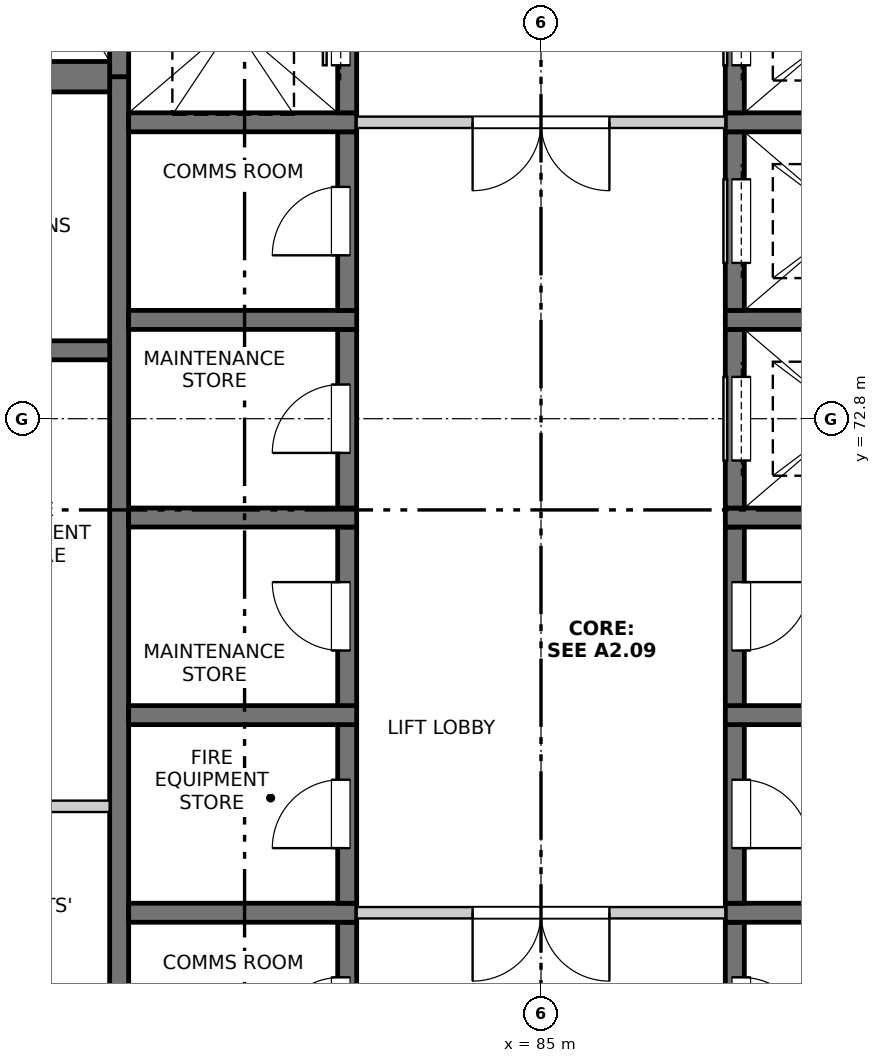
"""IFC4 building model, lengths in metres.
Left out: names, types, materials, properties, quantities, classifications, styles, units other than length and angle.
Written with IfcOpenShell. Run it as: python <this file> out.ifc"""

import sys

from ifc_helpers import new_model, si_unit, direction, frame, frame_2d, origin, place, context, subcontext, project, spatial, rectangle, extrude, element, fill, save


model = new_model("IFC4")
c1 = context("Model", 3, precision=1e-05, world=origin(), true_north=direction((0.0, 1.0)))
c2 = subcontext(c1, "Body", "Model", "MODEL_VIEW")
j1 = project(units=[si_unit("LENGTHUNIT", "METRE"), si_unit("PLANEANGLEUNIT", "RADIAN")], contexts=[c1])
p1 = place(None, origin())
s1 = spatial("IfcSite", under=j1, at=p1, CompositionType="ELEMENT")
p2 = place(p1, origin())
s2 = spatial("IfcBuilding", under=s1, at=p2, CompositionType="ELEMENT")
p3 = place(p2, frame((0.0, 0.0, 252.8)))
s3 = spatial("IfcBuildingStorey", under=s2, at=p3, CompositionType="ELEMENT", Elevation=252.8)
p4 = place(p3, frame((79.45, 60.975, -0.25), z_axis=(0.0, 0.0, 1.0), x_axis=(0.0, 1.0, 0.0)))
e1 = element("IfcWall", 1, at=p4, inside=s3, PredefinedType="SOLIDWALL", context=c2, shape_type="SweptSolid", body=[
    extrude(rectangle(XDim=16.325, YDim=0.25, at=frame_2d((8.163, 0.0))), origin(), (0.0, 0.0, 1.0), 3.4),
])
p5 = place(p3, frame((79.45, 77.3, -0.25), z_axis=(0.0, 0.0, 1.0), x_axis=(0.0, 1.0, 0.0)))
e2 = element("IfcWall", 2, at=p5, inside=s3, PredefinedType="SOLIDWALL", context=c2, shape_type="SweptSolid", body=[
    extrude(rectangle(XDim=7.0, YDim=0.25, at=frame_2d((3.5, 0.0))), origin(), (0.0, 0.0, 1.0), 3.4),
])
p6 = place(p3, frame((82.45, 63.825, -0.25), z_axis=(0.0, 0.0, 1.0), x_axis=(0.0, 1.0, 0.0)))
e3 = element("IfcWall", 3, at=p6, inside=s3, PredefinedType="SOLIDWALL", context=c2, shape_type="SweptSolid", body=[
    extrude(rectangle(XDim=2.35, YDim=0.25, at=frame_2d((1.175, 0.0))), origin(), (0.0, 0.0, 1.0), 3.4),
])
p7 = place(p6, frame((0.725, 0.0, 0.25)))
e4 = element("IfcOpeningElement", 4, at=p7, cuts=e3, PredefinedType="OPENING", context=c2, shape_type="SweptSolid", body=[
    extrude(rectangle(XDim=0.9, YDim=2.1, at=frame_2d((0.45, 1.05))), frame((0.0, 0.135, 0.0), z_axis=(0.0, -1.0, 0.0), x_axis=(1.0, 0.0, 0.0)), (0.0, 0.0, 1.0), 0.27),
])
p8 = place(p3, frame((79.575, 66.3, -0.25), z_axis=(0.0, 0.0, 1.0), x_axis=(1.0, 0.0, 0.0)))
e5 = element("IfcWall", 5, at=p8, inside=s3, PredefinedType="SOLIDWALL", context=c2, shape_type="SweptSolid", body=[
    extrude(rectangle(XDim=3.0, YDim=0.25, at=frame_2d((1.5, 0.0))), origin(), (0.0, 0.0, 1.0), 3.4),
])
p9 = place(p3, frame((82.45, 66.425, -0.25), z_axis=(0.0, 0.0, 1.0), x_axis=(0.0, 1.0, 0.0)))
e6 = element("IfcWall", 6, at=p9, inside=s3, PredefinedType="SOLIDWALL", context=c2, shape_type="SweptSolid", body=[
    extrude(rectangle(XDim=2.35, YDim=0.25, at=frame_2d((1.175, 0.0))), origin(), (0.0, 0.0, 1.0), 3.4),
])
p10 = place(p9, frame((0.725, 0.0, 0.25)))
e7 = element("IfcOpeningElement", 7, at=p10, cuts=e6, PredefinedType="OPENING", context=c2, shape_type="SweptSolid", body=[
    extrude(rectangle(XDim=0.9, YDim=2.1, at=frame_2d((0.45, 1.05))), frame((0.0, 0.135, 0.0), z_axis=(0.0, -1.0, 0.0), x_axis=(1.0, 0.0, 0.0)), (0.0, 0.0, 1.0), 0.27),
])
p11 = place(p3, frame((79.575, 68.9, -0.25), z_axis=(0.0, 0.0, 1.0), x_axis=(1.0, 0.0, 0.0)))
e8 = element("IfcWall", 8, at=p11, inside=s3, PredefinedType="SOLIDWALL", context=c2, shape_type="SweptSolid", body=[
    extrude(rectangle(XDim=3.0, YDim=0.25, at=frame_2d((1.5, 0.0))), origin(), (0.0, 0.0, 1.0), 3.4),
])
p12 = place(p3, frame((82.45, 69.025, -0.25), z_axis=(0.0, 0.0, 1.0), x_axis=(0.0, 1.0, 0.0)))
e9 = element("IfcWall", 9, at=p12, inside=s3, PredefinedType="SOLIDWALL", context=c2, shape_type="SweptSolid", body=[
    extrude(rectangle(XDim=2.35, YDim=0.25, at=frame_2d((1.175, 0.0))), origin(), (0.0, 0.0, 1.0), 3.4),
])
p13 = place(p12, frame((0.725, 0.0, 0.25)))
e10 = element("IfcOpeningElement", 10, at=p13, cuts=e9, PredefinedType="OPENING", context=c2, shape_type="SweptSolid", body=[
    extrude(rectangle(XDim=0.9, YDim=2.1, at=frame_2d((0.45, 1.05))), frame((0.0, 0.135, 0.0), z_axis=(0.0, -1.0, 0.0), x_axis=(1.0, 0.0, 0.0)), (0.0, 0.0, 1.0), 0.27),
])
p14 = place(p3, frame((79.575, 71.5, -0.25), z_axis=(0.0, 0.0, 1.0), x_axis=(1.0, 0.0, 0.0)))
e11 = element("IfcWall", 11, at=p14, inside=s3, PredefinedType="SOLIDWALL", context=c2, shape_type="SweptSolid", body=[
    extrude(rectangle(XDim=3.0, YDim=0.25, at=frame_2d((1.5, 0.0))), origin(), (0.0, 0.0, 1.0), 3.4),
])
p15 = place(p3, frame((82.45, 71.625, -0.25), z_axis=(0.0, 0.0, 1.0), x_axis=(0.0, 1.0, 0.0)))
e12 = element("IfcWall", 12, at=p15, inside=s3, PredefinedType="SOLIDWALL", context=c2, shape_type="SweptSolid", body=[
    extrude(rectangle(XDim=2.35, YDim=0.25, at=frame_2d((1.175, 0.0))), origin(), (0.0, 0.0, 1.0), 3.4),
])
p16 = place(p15, frame((0.725, 0.0, 0.25)))
e13 = element("IfcOpeningElement", 13, at=p16, cuts=e12, PredefinedType="OPENING", context=c2, shape_type="SweptSolid", body=[
    extrude(rectangle(XDim=0.9, YDim=2.1, at=frame_2d((0.45, 1.05))), frame((0.0, 0.135, 0.0), z_axis=(0.0, -1.0, 0.0), x_axis=(1.0, 0.0, 0.0)), (0.0, 0.0, 1.0), 0.27),
])
p17 = place(p3, frame((79.575, 74.1, -0.25), z_axis=(0.0, 0.0, 1.0), x_axis=(1.0, 0.0, 0.0)))
e14 = element("IfcWall", 14, at=p17, inside=s3, PredefinedType="SOLIDWALL", context=c2, shape_type="SweptSolid", body=[
    extrude(rectangle(XDim=3.0, YDim=0.25, at=frame_2d((1.5, 0.0))), origin(), (0.0, 0.0, 1.0), 3.4),
])
p18 = place(p3, frame((82.45, 74.225, -0.25), z_axis=(0.0, 0.0, 1.0), x_axis=(0.0, 1.0, 0.0)))
e15 = element("IfcWall", 15, at=p18, inside=s3, PredefinedType="SOLIDWALL", context=c2, shape_type="SweptSolid", body=[
    extrude(rectangle(XDim=2.35, YDim=0.25, at=frame_2d((1.175, 0.0))), origin(), (0.0, 0.0, 1.0), 3.4),
])
p19 = place(p18, frame((0.725, 0.0, 0.25)))
e16 = element("IfcOpeningElement", 16, at=p19, cuts=e15, PredefinedType="OPENING", context=c2, shape_type="SweptSolid", body=[
    extrude(rectangle(XDim=0.9, YDim=2.1, at=frame_2d((0.45, 1.05))), frame((0.0, 0.135, 0.0), z_axis=(0.0, -1.0, 0.0), x_axis=(1.0, 0.0, 0.0)), (0.0, 0.0, 1.0), 0.27),
])
p20 = place(p3, frame((79.575, 76.7, -0.25), z_axis=(0.0, 0.0, 1.0), x_axis=(1.0, 0.0, 0.0)))
e17 = element("IfcWall", 17, at=p20, inside=s3, PredefinedType="SOLIDWALL", context=c2, shape_type="SweptSolid", body=[
    extrude(rectangle(XDim=3.0, YDim=0.25, at=frame_2d((1.5, 0.0))), origin(), (0.0, 0.0, 1.0), 3.4),
])
p21 = place(p3, frame((82.45, 76.825, -0.25), z_axis=(0.0, 0.0, 1.0), x_axis=(0.0, 1.0, 0.0)))
e18 = element("IfcWall", 18, at=p21, inside=s3, PredefinedType="SOLIDWALL", context=c2, shape_type="SweptSolid", body=[
    extrude(rectangle(XDim=2.35, YDim=0.25, at=frame_2d((1.175, 0.0))), origin(), (0.0, 0.0, 1.0), 3.4),
])
p22 = place(p21, frame((0.625, 0.0, 0.25)))
e19 = element("IfcOpeningElement", 19, at=p22, cuts=e18, PredefinedType="OPENING", context=c2, shape_type="SweptSolid", body=[
    extrude(rectangle(XDim=1.1, YDim=2.1, at=frame_2d((0.55, 1.05))), frame((0.0, 0.135, 0.0), z_axis=(0.0, -1.0, 0.0), x_axis=(1.0, 0.0, 0.0)), (0.0, 0.0, 1.0), 0.27),
])
p23 = place(p3, frame((87.55, 63.825, -0.25), z_axis=(0.0, 0.0, 1.0), x_axis=(0.0, 1.0, 0.0)))
e20 = element("IfcWall", 20, at=p23, inside=s3, PredefinedType="SOLIDWALL", context=c2, shape_type="SweptSolid", body=[
    extrude(rectangle(XDim=2.35, YDim=0.25, at=frame_2d((1.175, 0.0))), origin(), (0.0, 0.0, 1.0), 3.4),
])
p24 = place(p23, frame((0.725, 0.0, 0.25)))
e21 = element("IfcOpeningElement", 21, at=p24, cuts=e20, PredefinedType="OPENING", context=c2, shape_type="SweptSolid", body=[
    extrude(rectangle(XDim=0.9, YDim=2.1, at=frame_2d((0.45, 1.05))), frame((0.0, 0.135, 0.0), z_axis=(0.0, -1.0, 0.0), x_axis=(1.0, 0.0, 0.0)), (0.0, 0.0, 1.0), 0.27),
])
p25 = place(p3, frame((87.425, 66.3, -0.25), z_axis=(0.0, 0.0, 1.0), x_axis=(1.0, 0.0, 0.0)))
e22 = element("IfcWall", 22, at=p25, inside=s3, PredefinedType="SOLIDWALL", context=c2, shape_type="SweptSolid", body=[
    extrude(rectangle(XDim=3.0, YDim=0.25, at=frame_2d((1.5, 0.0))), origin(), (0.0, 0.0, 1.0), 3.4),
])
p26 = place(p3, frame((87.55, 66.425, -0.25), z_axis=(0.0, 0.0, 1.0), x_axis=(0.0, 1.0, 0.0)))
e23 = element("IfcWall", 23, at=p26, inside=s3, PredefinedType="SOLIDWALL", context=c2, shape_type="SweptSolid", body=[
    extrude(rectangle(XDim=2.35, YDim=0.25, at=frame_2d((1.175, 0.0))), origin(), (0.0, 0.0, 1.0), 3.4),
])
p27 = place(p26, frame((0.725, 0.0, 0.25)))
e24 = element("IfcOpeningElement", 24, at=p27, cuts=e23, PredefinedType="OPENING", context=c2, shape_type="SweptSolid", body=[
    extrude(rectangle(XDim=0.9, YDim=2.1, at=frame_2d((0.45, 1.05))), frame((0.0, 0.135, 0.0), z_axis=(0.0, -1.0, 0.0), x_axis=(1.0, 0.0, 0.0)), (0.0, 0.0, 1.0), 0.27),
])
p28 = place(p3, frame((87.425, 68.9, -0.25), z_axis=(0.0, 0.0, 1.0), x_axis=(1.0, 0.0, 0.0)))
e25 = element("IfcWall", 25, at=p28, inside=s3, PredefinedType="SOLIDWALL", context=c2, shape_type="SweptSolid", body=[
    extrude(rectangle(XDim=3.0, YDim=0.25, at=frame_2d((1.5, 0.0))), origin(), (0.0, 0.0, 1.0), 3.4),
])
p29 = place(p3, frame((87.55, 69.025, -0.25), z_axis=(0.0, 0.0, 1.0), x_axis=(0.0, 1.0, 0.0)))
e26 = element("IfcWall", 26, at=p29, inside=s3, PredefinedType="SOLIDWALL", context=c2, shape_type="SweptSolid", body=[
    extrude(rectangle(XDim=2.35, YDim=0.25, at=frame_2d((1.175, 0.0))), origin(), (0.0, 0.0, 1.0), 3.4),
])
p30 = place(p29, frame((0.725, 0.0, 0.25)))
e27 = element("IfcOpeningElement", 27, at=p30, cuts=e26, PredefinedType="OPENING", context=c2, shape_type="SweptSolid", body=[
    extrude(rectangle(XDim=0.9, YDim=2.1, at=frame_2d((0.45, 1.05))), frame((0.0, 0.135, 0.0), z_axis=(0.0, -1.0, 0.0), x_axis=(1.0, 0.0, 0.0)), (0.0, 0.0, 1.0), 0.27),
])
p31 = place(p3, frame((87.425, 71.5, -0.25), z_axis=(0.0, 0.0, 1.0), x_axis=(1.0, 0.0, 0.0)))
e28 = element("IfcWall", 28, at=p31, inside=s3, PredefinedType="SOLIDWALL", context=c2, shape_type="SweptSolid", body=[
    extrude(rectangle(XDim=3.0, YDim=0.25, at=frame_2d((1.5, 0.0))), origin(), (0.0, 0.0, 1.0), 3.4),
])
p32 = place(p3, frame((87.55, 71.625, -0.25), z_axis=(0.0, 0.0, 1.0), x_axis=(0.0, 1.0, 0.0)))
e29 = element("IfcWall", 29, at=p32, inside=s3, PredefinedType="SOLIDWALL", context=c2, shape_type="SweptSolid", body=[
    extrude(rectangle(XDim=2.35, YDim=0.25, at=frame_2d((1.175, 0.0))), origin(), (0.0, 0.0, 1.0), 3.4),
])
p33 = place(p32, frame((0.625, 0.0, 0.25)))
e30 = element("IfcOpeningElement", 30, at=p33, cuts=e29, PredefinedType="OPENING", context=c2, shape_type="SweptSolid", body=[
    extrude(rectangle(XDim=1.1, YDim=2.1, at=frame_2d((0.55, 1.05))), frame((0.0, 0.135, 0.0), z_axis=(0.0, -1.0, 0.0), x_axis=(1.0, 0.0, 0.0)), (0.0, 0.0, 1.0), 0.27),
])
p34 = place(p3, frame((87.425, 74.1, -0.25), z_axis=(0.0, 0.0, 1.0), x_axis=(1.0, 0.0, 0.0)))
e31 = element("IfcWall", 31, at=p34, inside=s3, PredefinedType="SOLIDWALL", context=c2, shape_type="SweptSolid", body=[
    extrude(rectangle(XDim=3.0, YDim=0.25, at=frame_2d((1.5, 0.0))), origin(), (0.0, 0.0, 1.0), 3.4),
])
p35 = place(p3, frame((87.55, 74.225, -0.25), z_axis=(0.0, 0.0, 1.0), x_axis=(0.0, 1.0, 0.0)))
e32 = element("IfcWall", 32, at=p35, inside=s3, PredefinedType="SOLIDWALL", context=c2, shape_type="SweptSolid", body=[
    extrude(rectangle(XDim=2.35, YDim=0.25, at=frame_2d((1.175, 0.0))), origin(), (0.0, 0.0, 1.0), 3.4),
])
p36 = place(p35, frame((0.625, 0.0, 0.25)))
e33 = element("IfcOpeningElement", 33, at=p36, cuts=e32, PredefinedType="OPENING", context=c2, shape_type="SweptSolid", body=[
    extrude(rectangle(XDim=1.1, YDim=2.1, at=frame_2d((0.55, 1.05))), frame((0.0, 0.135, 0.0), z_axis=(0.0, -1.0, 0.0), x_axis=(1.0, 0.0, 0.0)), (0.0, 0.0, 1.0), 0.27),
])
p37 = place(p3, frame((87.425, 76.7, -0.25), z_axis=(0.0, 0.0, 1.0), x_axis=(1.0, 0.0, 0.0)))
e34 = element("IfcWall", 34, at=p37, inside=s3, PredefinedType="SOLIDWALL", context=c2, shape_type="SweptSolid", body=[
    extrude(rectangle(XDim=3.0, YDim=0.25, at=frame_2d((1.5, 0.0))), origin(), (0.0, 0.0, 1.0), 3.4),
])
p38 = place(p3, frame((87.55, 76.825, -0.25), z_axis=(0.0, 0.0, 1.0), x_axis=(0.0, 1.0, 0.0)))
e35 = element("IfcWall", 35, at=p38, inside=s3, PredefinedType="SOLIDWALL", context=c2, shape_type="SweptSolid", body=[
    extrude(rectangle(XDim=2.35, YDim=0.25, at=frame_2d((1.175, 0.0))), origin(), (0.0, 0.0, 1.0), 3.4),
])
p39 = place(p38, frame((0.625, 0.0, 0.25)))
e36 = element("IfcOpeningElement", 36, at=p39, cuts=e35, PredefinedType="OPENING", context=c2, shape_type="SweptSolid", body=[
    extrude(rectangle(XDim=1.1, YDim=2.1, at=frame_2d((0.55, 1.05))), frame((0.0, 0.135, 0.0), z_axis=(0.0, -1.0, 0.0), x_axis=(1.0, 0.0, 0.0)), (0.0, 0.0, 1.0), 0.27),
])
p40 = place(p3, frame((75.45, 73.7, -0.25), z_axis=(0.0, 0.0, 1.0), x_axis=(1.0, 0.0, 0.0)))
e37 = element("IfcWall", 37, at=p40, inside=s3, PredefinedType="SOLIDWALL", context=c2, shape_type="SweptSolid", body=[
    extrude(rectangle(XDim=3.875, YDim=0.25, at=frame_2d((1.938, 0.0))), origin(), (0.0, 0.0, 1.0), 3.4),
])
p41 = place(p3, frame((75.45, 77.3, -0.25), z_axis=(0.0, 0.0, 1.0), x_axis=(1.0, 0.0, 0.0)))
e38 = element("IfcWall", 38, at=p41, inside=s3, PredefinedType="SOLIDWALL", context=c2, shape_type="SweptSolid", body=[
    extrude(rectangle(XDim=3.875, YDim=0.4, at=frame_2d((1.938, 0.0))), origin(), (0.0, 0.0, 1.0), 3.4),
])
p42 = place(p3, frame((82.575, 66.3, 0.0), z_axis=(0.0, 0.0, 1.0), x_axis=(1.0, 0.0, 0.0)))
e39 = element("IfcWall", 39, at=p42, inside=s3, PredefinedType="PARTITIONING", context=c2, shape_type="SweptSolid", body=[
    extrude(rectangle(XDim=4.85, YDim=0.15, at=frame_2d((2.425, 0.0))), origin(), (0.0, 0.0, 1.0), 3.15),
])
p43 = place(p42, frame((1.525, 0.0, 0.0)))
e40 = element("IfcOpeningElement", 40, at=p43, cuts=e39, PredefinedType="OPENING", context=c2, shape_type="SweptSolid", body=[
    extrude(rectangle(XDim=1.8, YDim=2.1, at=frame_2d((0.9, 1.05))), frame((0.0, 0.085, 0.0), z_axis=(0.0, -1.0, 0.0), x_axis=(1.0, 0.0, 0.0)), (0.0, 0.0, 1.0), 0.17),
])
p44 = place(p3, frame((75.45, 67.7, 0.0), z_axis=(0.0, 0.0, 1.0), x_axis=(1.0, 0.0, 0.0)))
e41 = element("IfcWall", 41, at=p44, inside=s3, PredefinedType="PARTITIONING", context=c2, shape_type="SweptSolid", body=[
    extrude(rectangle(XDim=3.875, YDim=0.15, at=frame_2d((1.938, 0.0))), origin(), (0.0, 0.0, 1.0), 3.15),
])
p45 = place(p3, frame((82.575, 76.7, 0.0), z_axis=(0.0, 0.0, 1.0), x_axis=(1.0, 0.0, 0.0)))
e42 = element("IfcWall", 42, at=p45, inside=s3, PredefinedType="PARTITIONING", context=c2, shape_type="SweptSolid", body=[
    extrude(rectangle(XDim=4.85, YDim=0.15, at=frame_2d((2.425, 0.0))), origin(), (0.0, 0.0, 1.0), 3.15),
])
p46 = place(p45, frame((1.525, 0.0, 0.0)))
e43 = element("IfcOpeningElement", 43, at=p46, cuts=e42, PredefinedType="OPENING", context=c2, shape_type="SweptSolid", body=[
    extrude(rectangle(XDim=1.8, YDim=2.1, at=frame_2d((0.9, 1.05))), frame((0.0, 0.085, 0.0), z_axis=(0.0, -1.0, 0.0), x_axis=(1.0, 0.0, 0.0)), (0.0, 0.0, 1.0), 0.17),
])
p47 = place(p7, origin())
e44 = element("IfcDoor", 44, at=p47, inside=s3, OperationType="SINGLE_SWING_LEFT", PredefinedType="DOOR", context=c2, shape_type="SweptSolid", body=[
    extrude(rectangle(XDim=0.9, YDim=2.1, at=frame_2d((0.45, 1.05))), frame((0.0, 0.11, 0.0), z_axis=(0.0, -1.0, 0.0), x_axis=(1.0, 0.0, 0.0)), (0.0, 0.0, 1.0), 0.05),
])
fill(e4, e44)
p48 = place(p24, origin())
e45 = element("IfcDoor", 45, at=p48, inside=s3, OperationType="SINGLE_SWING_RIGHT", PredefinedType="DOOR", context=c2, shape_type="SweptSolid", body=[
    extrude(rectangle(XDim=0.9, YDim=2.1, at=frame_2d((0.45, 1.05))), frame((0.0, -0.06, 0.0), z_axis=(0.0, -1.0, 0.0), x_axis=(1.0, 0.0, 0.0)), (0.0, 0.0, 1.0), 0.05),
])
fill(e21, e45)
p49 = place(p43, origin())
e46 = element("IfcDoor", 46, at=p49, inside=s3, OperationType="DOUBLE_DOOR_SINGLE_SWING", PredefinedType="DOOR", context=c2, shape_type="SweptSolid", body=[
    extrude(rectangle(XDim=1.8, YDim=2.1, at=frame_2d((0.9, 1.05))), frame((0.0, 0.025, 0.0), z_axis=(0.0, -1.0, 0.0), x_axis=(1.0, 0.0, 0.0)), (0.0, 0.0, 1.0), 0.05),
])
fill(e40, e46)
p50 = place(p10, origin())
e47 = element("IfcDoor", 47, at=p50, inside=s3, OperationType="SINGLE_SWING_LEFT", PredefinedType="DOOR", context=c2, shape_type="SweptSolid", body=[
    extrude(rectangle(XDim=0.9, YDim=2.1, at=frame_2d((0.45, 1.05))), frame((0.0, 0.11, 0.0), z_axis=(0.0, -1.0, 0.0), x_axis=(1.0, 0.0, 0.0)), (0.0, 0.0, 1.0), 0.05),
])
fill(e7, e47)
p51 = place(p27, origin())
e48 = element("IfcDoor", 48, at=p51, inside=s3, OperationType="SINGLE_SWING_RIGHT", PredefinedType="DOOR", context=c2, shape_type="SweptSolid", body=[
    extrude(rectangle(XDim=0.9, YDim=2.1, at=frame_2d((0.45, 1.05))), frame((0.0, -0.06, 0.0), z_axis=(0.0, -1.0, 0.0), x_axis=(1.0, 0.0, 0.0)), (0.0, 0.0, 1.0), 0.05),
])
fill(e24, e48)
p52 = place(p13, origin())
e49 = element("IfcDoor", 49, at=p52, inside=s3, OperationType="SINGLE_SWING_RIGHT", PredefinedType="DOOR", context=c2, shape_type="SweptSolid", body=[
    extrude(rectangle(XDim=0.9, YDim=2.1, at=frame_2d((0.45, 1.05))), frame((0.0, 0.11, 0.0), z_axis=(0.0, -1.0, 0.0), x_axis=(1.0, 0.0, 0.0)), (0.0, 0.0, 1.0), 0.05),
])
fill(e10, e49)
p53 = place(p30, origin())
e50 = element("IfcDoor", 50, at=p53, inside=s3, OperationType="SINGLE_SWING_LEFT", PredefinedType="DOOR", context=c2, shape_type="SweptSolid", body=[
    extrude(rectangle(XDim=0.9, YDim=2.1, at=frame_2d((0.45, 1.05))), frame((0.0, -0.06, 0.0), z_axis=(0.0, -1.0, 0.0), x_axis=(1.0, 0.0, 0.0)), (0.0, 0.0, 1.0), 0.05),
])
fill(e27, e50)
p54 = place(p16, origin())
e51 = element("IfcDoor", 51, at=p54, inside=s3, OperationType="SINGLE_SWING_LEFT", PredefinedType="DOOR", context=c2, shape_type="SweptSolid", body=[
    extrude(rectangle(XDim=0.9, YDim=2.1, at=frame_2d((0.45, 1.05))), frame((0.0, 0.11, 0.0), z_axis=(0.0, -1.0, 0.0), x_axis=(1.0, 0.0, 0.0)), (0.0, 0.0, 1.0), 0.05),
])
fill(e13, e51)
p55 = place(p33, origin())
e52 = element("IfcDoor", 52, at=p55, inside=s3, OperationType="SLIDING_TO_LEFT", PredefinedType="DOOR", context=c2, shape_type="SweptSolid", body=[
    extrude(rectangle(XDim=1.1, YDim=2.1, at=frame_2d((0.55, 1.05))), frame((0.0, -0.06, 0.0), z_axis=(0.0, -1.0, 0.0), x_axis=(1.0, 0.0, 0.0)), (0.0, 0.0, 1.0), 0.05),
])
fill(e30, e52)
p56 = place(p19, origin())
e53 = element("IfcDoor", 53, at=p56, inside=s3, OperationType="SINGLE_SWING_LEFT", PredefinedType="DOOR", context=c2, shape_type="SweptSolid", body=[
    extrude(rectangle(XDim=0.9, YDim=2.1, at=frame_2d((0.45, 1.05))), frame((0.0, 0.11, 0.0), z_axis=(0.0, -1.0, 0.0), x_axis=(1.0, 0.0, 0.0)), (0.0, 0.0, 1.0), 0.05),
])
fill(e16, e53)
p57 = place(p36, origin())
e54 = element("IfcDoor", 54, at=p57, inside=s3, OperationType="SLIDING_TO_LEFT", PredefinedType="DOOR", context=c2, shape_type="SweptSolid", body=[
    extrude(rectangle(XDim=1.1, YDim=2.1, at=frame_2d((0.55, 1.05))), frame((0.0, -0.06, 0.0), z_axis=(0.0, -1.0, 0.0), x_axis=(1.0, 0.0, 0.0)), (0.0, 0.0, 1.0), 0.05),
])
fill(e33, e54)
p58 = place(p46, origin())
e55 = element("IfcDoor", 55, at=p58, inside=s3, OperationType="DOUBLE_DOOR_SINGLE_SWING", PredefinedType="DOOR", context=c2, shape_type="SweptSolid", body=[
    extrude(rectangle(XDim=1.8, YDim=2.1, at=frame_2d((0.9, 1.05))), frame((0.0, 0.025, 0.0), z_axis=(0.0, -1.0, 0.0), x_axis=(1.0, 0.0, 0.0)), (0.0, 0.0, 1.0), 0.05),
])
fill(e43, e55)
p59 = place(p22, origin())
e56 = element("IfcDoor", 56, at=p59, inside=s3, OperationType="SLIDING_TO_LEFT", PredefinedType="DOOR", context=c2, shape_type="SweptSolid", body=[
    extrude(rectangle(XDim=1.1, YDim=2.1, at=frame_2d((0.55, 1.05))), frame((0.0, 0.11, 0.0), z_axis=(0.0, -1.0, 0.0), x_axis=(1.0, 0.0, 0.0)), (0.0, 0.0, 1.0), 0.05),
])
fill(e19, e56)
p60 = place(p39, origin())
e57 = element("IfcDoor", 57, at=p60, inside=s3, OperationType="SLIDING_TO_LEFT", PredefinedType="DOOR", context=c2, shape_type="SweptSolid", body=[
    extrude(rectangle(XDim=1.1, YDim=2.1, at=frame_2d((0.55, 1.05))), frame((0.0, -0.06, 0.0), z_axis=(0.0, -1.0, 0.0), x_axis=(1.0, 0.0, 0.0)), (0.0, 0.0, 1.0), 0.05),
])
fill(e36, e57)
save(model, sys.argv[1])
